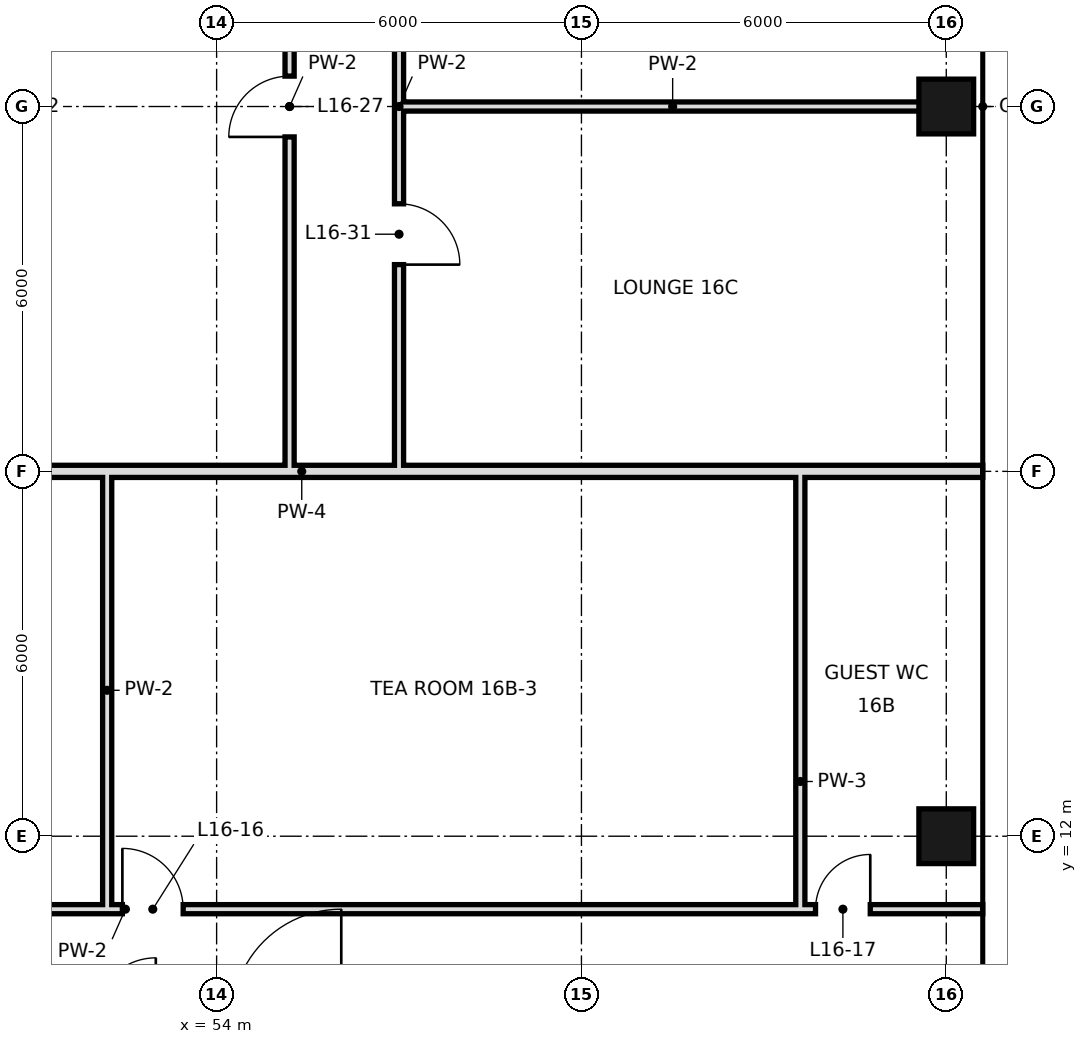
"""IFC4 building model, lengths in metres.
Left out: names, types, materials, properties, quantities, classifications, styles, units other than length and angle.
Written with IfcOpenShell. Run it as: python <this file> out.ifc"""

import sys

from ifc_helpers import new_model, si_unit, direction, frame, frame_2d, origin, origin_2d, place, context, subcontext, project, spatial, rectangle, hollow_rectangle, extrude, element, fill, save


model = new_model("IFC4")
c1 = context("Model", 3, precision=1e-05, world=origin(), true_north=direction((0.0, 1.0)))
c2 = subcontext(c1, "Body", "Model", "MODEL_VIEW")
j1 = project(units=[si_unit("LENGTHUNIT", "METRE"), si_unit("PLANEANGLEUNIT", "RADIAN")], contexts=[c1])
p1 = place(None, origin())
s1 = spatial("IfcSite", under=j1, at=p1, CompositionType="ELEMENT")
p2 = place(p1, origin())
s2 = spatial("IfcBuilding", under=s1, at=p2, CompositionType="ELEMENT")
p3 = place(p2, frame((0.0, 0.0, 78.6)))
s3 = spatial("IfcBuildingStorey", under=s2, at=p3, CompositionType="ELEMENT", Elevation=78.6)
for number, where, z_axis, x_axis in (
    (1, (66.0, 12.0, 0.0), (0.0, 0.0, 1.0), (1.0, 0.0, 0.0)),
    (2, (66.0, 24.0, 0.0), (0.0, 0.0, 1.0), (1.0, 0.0, 0.0)),
):
    element("IfcColumn", number, at=place(p3, frame(where, z_axis=z_axis, x_axis=x_axis)), inside=s3, PredefinedType="COLUMN", context=c2, shape_type="SweptSolid", body=[
        extrude(hollow_rectangle(XDim=0.9, YDim=0.9, WallThickness=0.045, at=origin_2d()), origin(), (0.0, 0.0, 1.0), 3.6),
    ])
p4 = place(p3, frame((52.2, 10.8, 0.0), z_axis=(0.0, 0.0, 1.0), x_axis=(0.0, 1.0, 0.0)))
e3 = element("IfcWall", 3, at=p4, inside=s3, PredefinedType="PARTITIONING", context=c2, shape_type="SweptSolid", body=[
    extrude(rectangle(XDim=7.2, YDim=0.15, at=frame_2d((3.6, 0.0))), origin(), (0.0, 0.0, 1.0), 3.42),
])
p5 = place(p3, frame((55.2, 18.0, 0.0), z_axis=(0.0, 0.0, 1.0), x_axis=(0.0, 1.0, 0.0)))
e4 = element("IfcWall", 4, at=p5, inside=s3, PredefinedType="PARTITIONING", context=c2, shape_type="SweptSolid", body=[
    extrude(rectangle(XDim=12.0, YDim=0.15, at=frame_2d((6.0, 0.0))), origin(), (0.0, 0.0, 1.0), 3.42),
])
p6 = place(p5, frame((5.5, 0.0, 0.0)))
e5 = element("IfcOpeningElement", 5, at=p6, cuts=e4, PredefinedType="OPENING", context=c2, shape_type="SweptSolid", body=[
    extrude(rectangle(XDim=1.0, YDim=2.4, at=frame_2d((0.5, 1.2))), frame((0.0, 0.085, 0.0), z_axis=(0.0, -1.0, 0.0), x_axis=(1.0, 0.0, 0.0)), (0.0, 0.0, 1.0), 0.17),
])
p7 = place(p3, frame((57.0, 18.0, 0.0), z_axis=(0.0, 0.0, 1.0), x_axis=(0.0, 1.0, 0.0)))
e6 = element("IfcWall", 6, at=p7, inside=s3, PredefinedType="PARTITIONING", context=c2, shape_type="SweptSolid", body=[
    extrude(rectangle(XDim=12.0, YDim=0.15, at=frame_2d((6.0, 0.0))), origin(), (0.0, 0.0, 1.0), 3.42),
])
p8 = place(p7, frame((3.4, 0.0, 0.0)))
e7 = element("IfcOpeningElement", 7, at=p8, cuts=e6, PredefinedType="OPENING", context=c2, shape_type="SweptSolid", body=[
    extrude(rectangle(XDim=1.0, YDim=2.4, at=frame_2d((0.5, 1.2))), frame((0.0, 0.085, 0.0), z_axis=(0.0, -1.0, 0.0), x_axis=(1.0, 0.0, 0.0)), (0.0, 0.0, 1.0), 0.17),
])
p9 = place(p7, frame((9.4, 0.0, 0.0)))
e8 = element("IfcOpeningElement", 8, at=p9, cuts=e6, PredefinedType="OPENING", context=c2, shape_type="SweptSolid", body=[
    extrude(rectangle(XDim=1.0, YDim=2.4, at=frame_2d((0.5, 1.2))), frame((0.0, 0.085, 0.0), z_axis=(0.0, -1.0, 0.0), x_axis=(1.0, 0.0, 0.0)), (0.0, 0.0, 1.0), 0.17),
])
p10 = place(p3, frame((63.6, 10.8, 0.0), z_axis=(0.0, 0.0, 1.0), x_axis=(0.0, 1.0, 0.0)))
e9 = element("IfcWall", 9, at=p10, inside=s3, PredefinedType="PARTITIONING", context=c2, shape_type="SweptSolid", body=[
    extrude(rectangle(XDim=7.2, YDim=0.15, at=frame_2d((3.6, 0.0))), origin(), (0.0, 0.0, 1.0), 3.42),
])
p11 = place(p3, frame((41.4, 10.8, 0.0), z_axis=(0.0, 0.0, 1.0), x_axis=(1.0, 0.0, 0.0)))
e10 = element("IfcWall", 10, at=p11, inside=s3, PredefinedType="PARTITIONING", context=c2, shape_type="SweptSolid", body=[
    extrude(rectangle(XDim=22.2, YDim=0.15, at=frame_2d((11.1, 0.0))), origin(), (0.0, 0.0, 1.0), 3.42),
])
p12 = place(p11, frame((4.9, 0.0, 0.0)))
e11 = element("IfcOpeningElement", 11, at=p12, cuts=e10, PredefinedType="OPENING", context=c2, shape_type="SweptSolid", body=[
    extrude(rectangle(XDim=1.0, YDim=2.4, at=frame_2d((0.5, 1.2))), frame((0.0, 0.085, 0.0), z_axis=(0.0, -1.0, 0.0), x_axis=(1.0, 0.0, 0.0)), (0.0, 0.0, 1.0), 0.17),
])
p13 = place(p11, frame((11.05, 0.0, 0.0)))
e12 = element("IfcOpeningElement", 12, at=p13, cuts=e10, PredefinedType="OPENING", context=c2, shape_type="SweptSolid", body=[
    extrude(rectangle(XDim=1.0, YDim=2.4, at=frame_2d((0.5, 1.2))), frame((0.0, 0.085, 0.0), z_axis=(0.0, -1.0, 0.0), x_axis=(1.0, 0.0, 0.0)), (0.0, 0.0, 1.0), 0.17),
])
p14 = place(p3, frame((63.6, 10.8, 0.0), z_axis=(0.0, 0.0, 1.0), x_axis=(1.0, 0.0, 0.0)))
e13 = element("IfcWall", 13, at=p14, inside=s3, PredefinedType="PARTITIONING", context=c2, shape_type="SweptSolid", body=[
    extrude(rectangle(XDim=3.0, YDim=0.15, at=frame_2d((1.5, 0.0))), origin(), (0.0, 0.0, 1.0), 3.42),
])
p15 = place(p14, frame((0.25, 0.0, 0.0)))
e14 = element("IfcOpeningElement", 14, at=p15, cuts=e13, PredefinedType="OPENING", context=c2, shape_type="SweptSolid", body=[
    extrude(rectangle(XDim=0.9, YDim=2.4, at=frame_2d((0.45, 1.2))), frame((0.0, 0.085, 0.0), z_axis=(0.0, -1.0, 0.0), x_axis=(1.0, 0.0, 0.0)), (0.0, 0.0, 1.0), 0.17),
])
p16 = place(p3, frame((44.9, 18.0, 0.0), z_axis=(0.0, 0.0, 1.0), x_axis=(1.0, 0.0, 0.0)))
e15 = element("IfcWall", 15, at=p16, inside=s3, PredefinedType="SOLIDWALL", context=c2, shape_type="SweptSolid", body=[
    extrude(rectangle(XDim=21.7, YDim=0.2, at=frame_2d((10.85, 0.0))), origin(), (0.0, 0.0, 1.0), 2.52),
])
p17 = place(p3, frame((57.0, 24.0, 0.0), z_axis=(0.0, 0.0, 1.0), x_axis=(1.0, 0.0, 0.0)))
e16 = element("IfcWall", 16, at=p17, inside=s3, PredefinedType="PARTITIONING", context=c2, shape_type="SweptSolid", body=[
    extrude(rectangle(XDim=9.0, YDim=0.15, at=frame_2d((4.5, 0.0))), origin(), (0.0, 0.0, 1.0), 2.52),
])
p18 = place(p13, origin())
e17 = element("IfcDoor", 17, at=p18, inside=s3, OperationType="SINGLE_SWING_LEFT", PredefinedType="DOOR", context=c2, shape_type="SweptSolid", body=[
    extrude(rectangle(XDim=1.0, YDim=2.4, at=frame_2d((0.5, 1.2))), frame((0.0, 0.025, 0.0), z_axis=(0.0, -1.0, 0.0), x_axis=(1.0, 0.0, 0.0)), (0.0, 0.0, 1.0), 0.05),
])
fill(e12, e17)
p19 = place(p15, frame((0.9, 0.0, 0.0), z_axis=(0.0, 0.0, 1.0), x_axis=(-1.0, 0.0, 0.0)))
e18 = element("IfcDoor", 18, at=p19, inside=s3, OperationType="SINGLE_SWING_LEFT", PredefinedType="DOOR", context=c2, shape_type="SweptSolid", body=[
    extrude(rectangle(XDim=0.9, YDim=2.4, at=frame_2d((0.45, 1.2))), frame((0.0, 0.025, 0.0), z_axis=(0.0, -1.0, 0.0), x_axis=(1.0, 0.0, 0.0)), (0.0, 0.0, 1.0), 0.05),
])
fill(e14, e18)
p20 = place(p6, origin())
e19 = element("IfcDoor", 19, at=p20, inside=s3, OperationType="SINGLE_SWING_LEFT", PredefinedType="DOOR", context=c2, shape_type="SweptSolid", body=[
    extrude(rectangle(XDim=1.0, YDim=2.4, at=frame_2d((0.5, 1.2))), frame((0.0, 0.025, 0.0), z_axis=(0.0, -1.0, 0.0), x_axis=(1.0, 0.0, 0.0)), (0.0, 0.0, 1.0), 0.05),
])
fill(e5, e19)
p21 = place(p8, frame((1.0, 0.0, 0.0), z_axis=(0.0, 0.0, 1.0), x_axis=(-1.0, 0.0, 0.0)))
e20 = element("IfcDoor", 20, at=p21, inside=s3, OperationType="SINGLE_SWING_RIGHT", PredefinedType="DOOR", context=c2, shape_type="SweptSolid", body=[
    extrude(rectangle(XDim=1.0, YDim=2.4, at=frame_2d((0.5, 1.2))), frame((0.0, 0.025, 0.0), z_axis=(0.0, -1.0, 0.0), x_axis=(1.0, 0.0, 0.0)), (0.0, 0.0, 1.0), 0.05),
])
fill(e7, e20)
save(model, sys.argv[1])
